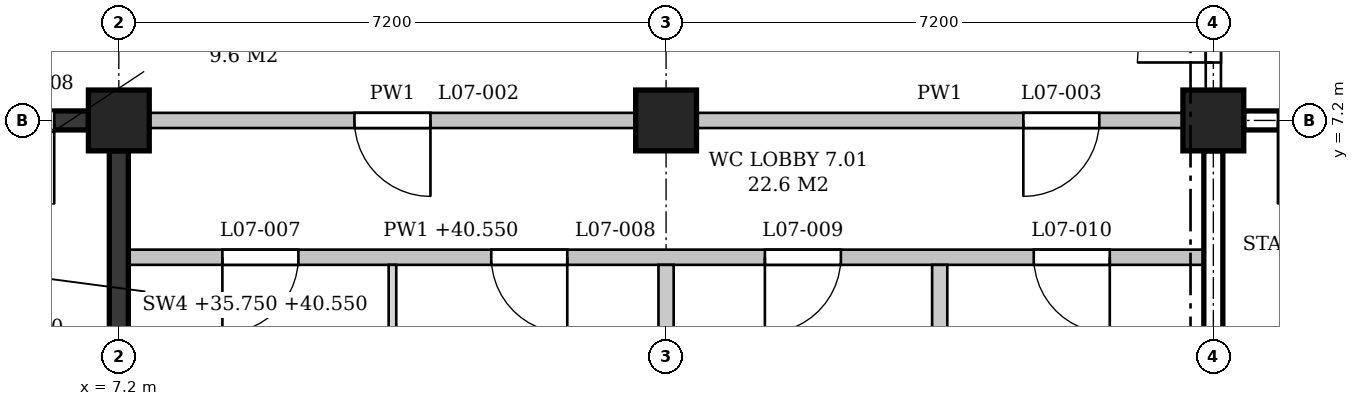
"""IFC4 building model, lengths in metres.
Left out: names, types, materials, properties, quantities, classifications, styles, units other than length and angle.
Written with IfcOpenShell. Run it as: python <this file> out.ifc"""

import sys

from ifc_helpers import new_model, si_unit, direction, frame, frame_2d, origin, origin_2d, place, context, subcontext, project, spatial, polyline, rectangle, outline, extrude, element, fill, save


model = new_model("IFC4")
c1 = context("Model", 3, precision=1e-05, world=origin(), true_north=direction((0.0, 1.0)))
c2 = subcontext(c1, "Body", "Model", "MODEL_VIEW")
j1 = project(units=[si_unit("LENGTHUNIT", "METRE"), si_unit("PLANEANGLEUNIT", "RADIAN")], contexts=[c1])
p1 = place(None, origin())
s1 = spatial("IfcSite", under=j1, at=p1, CompositionType="ELEMENT")
p2 = place(p1, origin())
s2 = spatial("IfcBuilding", under=s1, at=p2, CompositionType="ELEMENT")
p3 = place(p2, frame((0.0, 0.0, 36.0)))
s3 = spatial("IfcBuildingStorey", under=s2, at=p3, CompositionType="ELEMENT", Elevation=36.0)
for number, where, z_axis, x_axis in (
    (1, (7.2, 7.2, 0.0), (0.0, 0.0, 1.0), (1.0, 0.0, 0.0)),
    (2, (14.4, 7.2, 0.0), (0.0, 0.0, 1.0), (1.0, 0.0, 0.0)),
    (3, (21.6, 7.2, 0.0), (0.0, 0.0, 1.0), (1.0, 0.0, 0.0)),
):
    element("IfcColumn", number, at=place(p3, frame(where, z_axis=z_axis, x_axis=x_axis)), inside=s3, PredefinedType="COLUMN", context=c2, shape_type="SweptSolid", body=[
        extrude(rectangle(XDim=0.8, YDim=0.8, at=origin_2d()), origin(), (0.0, 0.0, 1.0), 4.8),
    ])
p4 = place(p3, frame((0.4, 7.2, 0.0), z_axis=(0.0, 0.0, 1.0), x_axis=(1.0, 0.0, 0.0)))
e4 = element("IfcWall", 4, at=p4, inside=s3, PredefinedType="SHEAR", context=c2, shape_type="SweptSolid", body=[
    extrude(rectangle(XDim=6.4, YDim=0.25, at=frame_2d((3.2, 0.0))), origin(), (0.0, 0.0, 1.0), 3.85),
])
p5 = place(p4, frame((4.85, 0.0, 0.0)))
e5 = element("IfcOpeningElement", 5, at=p5, cuts=e4, PredefinedType="OPENING", context=c2, shape_type="SweptSolid", body=[
    extrude(rectangle(XDim=1.1, YDim=2.1, at=frame_2d((0.55, 1.05))), frame((0.0, 0.135, 0.0), z_axis=(0.0, -1.0, 0.0), x_axis=(1.0, 0.0, 0.0)), (0.0, 0.0, 1.0), 0.27),
])
p6 = place(p3, frame((7.2, 0.4, 0.0), z_axis=(0.0, 0.0, 1.0), x_axis=(0.0, 1.0, 0.0)))
e6 = element("IfcWall", 6, at=p6, inside=s3, PredefinedType="SHEAR", context=c2, shape_type="SweptSolid", body=[
    extrude(rectangle(XDim=6.4, YDim=0.25, at=frame_2d((3.2, 0.0))), origin(), (0.0, 0.0, 1.0), 3.85),
])
p7 = place(p3, frame((22.0, 7.2, 0.0), z_axis=(0.0, 0.0, 1.0), x_axis=(1.0, 0.0, 0.0)))
e7 = element("IfcWall", 7, at=p7, inside=s3, PredefinedType="SHEAR", context=c2, shape_type="SweptSolid", body=[
    extrude(rectangle(XDim=6.4, YDim=0.25, at=frame_2d((3.2, 0.0))), origin(), (0.0, 0.0, 1.0), 3.85),
])
p8 = place(p7, frame((0.45, 0.0, 0.0)))
e8 = element("IfcOpeningElement", 8, at=p8, cuts=e7, PredefinedType="OPENING", context=c2, shape_type="SweptSolid", body=[
    extrude(rectangle(XDim=1.1, YDim=2.1, at=frame_2d((0.55, 1.05))), frame((0.0, 0.135, 0.0), z_axis=(0.0, -1.0, 0.0), x_axis=(1.0, 0.0, 0.0)), (0.0, 0.0, 1.0), 0.27),
])
p9 = place(p3, frame((21.6, 0.4, 0.0), z_axis=(0.0, 0.0, 1.0), x_axis=(0.0, 1.0, 0.0)))
e9 = element("IfcWall", 9, at=p9, inside=s3, PredefinedType="SHEAR", context=c2, shape_type="SweptSolid", body=[
    extrude(rectangle(XDim=6.4, YDim=0.25, at=frame_2d((3.2, 0.0))), origin(), (0.0, 0.0, 1.0), 3.85),
])
p10 = place(p3, frame((7.325, 5.4, 0.0), z_axis=(0.0, 0.0, 1.0), x_axis=(1.0, 0.0, 0.0)))
e10 = element("IfcWall", 10, at=p10, inside=s3, PredefinedType="PARTITIONING", context=c2, shape_type="SweptSolid", body=[
    extrude(outline(polyline([(0.0, 0.0), (14.15, 0.0), (14.15, 3.85), (14.05, 3.85), (14.05, 4.55), (7.3, 4.55), (7.3, 3.85), (6.85, 3.85), (6.85, 4.55), (0.1, 4.55), (0.1, 3.85), (0.0, 3.85), (0.0, 0.0)])), frame((0.0, 0.1, 0.0), z_axis=(0.0, -1.0, 0.0), x_axis=(1.0, 0.0, 0.0)), (0.0, 0.0, 1.0), 0.2),
])
p11 = place(p10, frame((1.238, 0.0, 0.0)))
e11 = element("IfcOpeningElement", 11, at=p11, cuts=e10, PredefinedType="OPENING", context=c2, shape_type="SweptSolid", body=[
    extrude(rectangle(XDim=1.0, YDim=2.1, at=frame_2d((0.5, 1.05))), frame((0.0, 0.11, 0.0), z_axis=(0.0, -1.0, 0.0), x_axis=(1.0, 0.0, 0.0)), (0.0, 0.0, 1.0), 0.22),
])
p12 = place(p10, frame((4.775, 0.0, 0.0)))
e12 = element("IfcOpeningElement", 12, at=p12, cuts=e10, PredefinedType="OPENING", context=c2, shape_type="SweptSolid", body=[
    extrude(rectangle(XDim=1.0, YDim=2.1, at=frame_2d((0.5, 1.05))), frame((0.0, 0.11, 0.0), z_axis=(0.0, -1.0, 0.0), x_axis=(1.0, 0.0, 0.0)), (0.0, 0.0, 1.0), 0.22),
])
p13 = place(p10, frame((8.375, 0.0, 0.0)))
e13 = element("IfcOpeningElement", 13, at=p13, cuts=e10, PredefinedType="OPENING", context=c2, shape_type="SweptSolid", body=[
    extrude(rectangle(XDim=1.0, YDim=2.1, at=frame_2d((0.5, 1.05))), frame((0.0, 0.11, 0.0), z_axis=(0.0, -1.0, 0.0), x_axis=(1.0, 0.0, 0.0)), (0.0, 0.0, 1.0), 0.22),
])
p14 = place(p10, frame((11.913, 0.0, 0.0)))
e14 = element("IfcOpeningElement", 14, at=p14, cuts=e10, PredefinedType="OPENING", context=c2, shape_type="SweptSolid", body=[
    extrude(rectangle(XDim=1.0, YDim=2.1, at=frame_2d((0.5, 1.05))), frame((0.0, 0.11, 0.0), z_axis=(0.0, -1.0, 0.0), x_axis=(1.0, 0.0, 0.0)), (0.0, 0.0, 1.0), 0.22),
])
p15 = place(p3, frame((7.6, 7.2, 0.0), z_axis=(0.0, 0.0, 1.0), x_axis=(1.0, 0.0, 0.0)))
e15 = element("IfcWall", 15, at=p15, inside=s3, PredefinedType="PARTITIONING", context=c2, shape_type="SweptSolid", body=[
    extrude(rectangle(XDim=6.4, YDim=0.2, at=frame_2d((3.2, 0.0))), origin(), (0.0, 0.0, 1.0), 3.85),
])
p16 = place(p15, frame((2.7, 0.0, 0.0)))
e16 = element("IfcOpeningElement", 16, at=p16, cuts=e15, PredefinedType="OPENING", context=c2, shape_type="SweptSolid", body=[
    extrude(rectangle(XDim=1.0, YDim=2.1, at=frame_2d((0.5, 1.05))), frame((0.0, 0.11, 0.0), z_axis=(0.0, -1.0, 0.0), x_axis=(1.0, 0.0, 0.0)), (0.0, 0.0, 1.0), 0.22),
])
p17 = place(p3, frame((14.8, 7.2, 0.0), z_axis=(0.0, 0.0, 1.0), x_axis=(1.0, 0.0, 0.0)))
e17 = element("IfcWall", 17, at=p17, inside=s3, PredefinedType="PARTITIONING", context=c2, shape_type="SweptSolid", body=[
    extrude(rectangle(XDim=6.4, YDim=0.2, at=frame_2d((3.2, 0.0))), origin(), (0.0, 0.0, 1.0), 3.85),
])
p18 = place(p17, frame((4.3, 0.0, 0.0)))
e18 = element("IfcOpeningElement", 18, at=p18, cuts=e17, PredefinedType="OPENING", context=c2, shape_type="SweptSolid", body=[
    extrude(rectangle(XDim=1.0, YDim=2.1, at=frame_2d((0.5, 1.05))), frame((0.0, 0.11, 0.0), z_axis=(0.0, -1.0, 0.0), x_axis=(1.0, 0.0, 0.0)), (0.0, 0.0, 1.0), 0.22),
])
p19 = place(p3, frame((10.8, 0.15, 0.0), z_axis=(0.0, 0.0, 1.0), x_axis=(0.0, 1.0, 0.0)))
e19 = element("IfcWall", 19, at=p19, inside=s3, PredefinedType="PARTITIONING", context=c2, shape_type="SweptSolid", body=[
    extrude(rectangle(XDim=5.15, YDim=0.1, at=frame_2d((2.575, 0.0))), origin(), (0.0, 0.0, 1.0), 3.85),
])
p20 = place(p3, frame((14.4, 0.4, 0.0), z_axis=(0.0, 0.0, 1.0), x_axis=(0.0, 1.0, 0.0)))
e20 = element("IfcWall", 20, at=p20, inside=s3, PredefinedType="PARTITIONING", context=c2, shape_type="SweptSolid", body=[
    extrude(rectangle(XDim=4.9, YDim=0.2, at=frame_2d((2.45, 0.0))), origin(), (0.0, 0.0, 1.0), 3.85),
])
p21 = place(p3, frame((18.0, 0.15, 0.0), z_axis=(0.0, 0.0, 1.0), x_axis=(0.0, 1.0, 0.0)))
e21 = element("IfcWall", 21, at=p21, inside=s3, PredefinedType="PARTITIONING", context=c2, shape_type="SweptSolid", body=[
    extrude(outline(polyline([(0.0, 0.0), (5.15, 0.0), (5.15, 4.55), (0.05, 4.55), (0.05, 3.95), (0.0, 3.95), (0.0, 0.0)])), frame((0.0, 0.1, 0.0), z_axis=(0.0, -1.0, 0.0), x_axis=(1.0, 0.0, 0.0)), (0.0, 0.0, 1.0), 0.2),
])
p22 = place(p3, frame((21.6, 7.6, 0.0), z_axis=(0.0, 0.0, 1.0), x_axis=(0.0, 1.0, 0.0)))
e22 = element("IfcWall", 22, at=p22, inside=s3, PredefinedType="PARTITIONING", context=c2, shape_type="SweptSolid", body=[
    extrude(rectangle(XDim=2.725, YDim=0.2, at=frame_2d((1.362, 0.0))), origin(), (0.0, 0.0, 1.0), 3.85),
])
p23 = place(p22, frame((0.362, 0.0, 0.0)))
e23 = element("IfcOpeningElement", 23, at=p23, cuts=e22, PredefinedType="OPENING", context=c2, shape_type="SweptSolid", body=[
    extrude(rectangle(XDim=2.0, YDim=2.4, at=frame_2d((1.0, 1.2))), frame((0.0, 0.11, 0.0), z_axis=(0.0, -1.0, 0.0), x_axis=(1.0, 0.0, 0.0)), (0.0, 0.0, 1.0), 0.22),
])
p24 = place(p5, frame((1.1, 0.0, 0.0), z_axis=(0.0, 0.0, 1.0), x_axis=(-1.0, 0.0, 0.0)))
e24 = element("IfcDoor", 24, at=p24, inside=s3, OperationType="SINGLE_SWING_LEFT", PredefinedType="DOOR", context=c2, shape_type="SweptSolid", body=[
    extrude(rectangle(XDim=1.1, YDim=2.1, at=frame_2d((0.55, 1.05))), frame((0.0, 0.025, 0.0), z_axis=(0.0, -1.0, 0.0), x_axis=(1.0, 0.0, 0.0)), (0.0, 0.0, 1.0), 0.05),
])
fill(e5, e24)
p25 = place(p8, frame((1.1, 0.0, 0.0), z_axis=(0.0, 0.0, 1.0), x_axis=(-1.0, 0.0, 0.0)))
e25 = element("IfcDoor", 25, at=p25, inside=s3, OperationType="SINGLE_SWING_RIGHT", PredefinedType="DOOR", context=c2, shape_type="SweptSolid", body=[
    extrude(rectangle(XDim=1.1, YDim=2.1, at=frame_2d((0.55, 1.05))), frame((0.0, 0.025, 0.0), z_axis=(0.0, -1.0, 0.0), x_axis=(1.0, 0.0, 0.0)), (0.0, 0.0, 1.0), 0.05),
])
fill(e8, e25)
p26 = place(p23, origin())
e26 = element("IfcDoor", 26, at=p26, inside=s3, OperationType="DOUBLE_DOOR_SINGLE_SWING", PredefinedType="DOOR", context=c2, shape_type="SweptSolid", body=[
    extrude(rectangle(XDim=2.0, YDim=2.4, at=frame_2d((1.0, 1.2))), frame((0.0, 0.025, 0.0), z_axis=(0.0, -1.0, 0.0), x_axis=(1.0, 0.0, 0.0)), (0.0, 0.0, 1.0), 0.05),
])
fill(e23, e26)
p27 = place(p16, frame((1.0, 0.0, 0.0), z_axis=(0.0, 0.0, 1.0), x_axis=(-1.0, 0.0, 0.0)))
e27 = element("IfcDoor", 27, at=p27, inside=s3, OperationType="SINGLE_SWING_LEFT", PredefinedType="DOOR", context=c2, shape_type="SweptSolid", body=[
    extrude(rectangle(XDim=1.0, YDim=2.1, at=frame_2d((0.5, 1.05))), frame((0.0, 0.025, 0.0), z_axis=(0.0, -1.0, 0.0), x_axis=(1.0, 0.0, 0.0)), (0.0, 0.0, 1.0), 0.05),
])
fill(e16, e27)
p28 = place(p18, frame((1.0, 0.0, 0.0), z_axis=(0.0, 0.0, 1.0), x_axis=(-1.0, 0.0, 0.0)))
e28 = element("IfcDoor", 28, at=p28, inside=s3, OperationType="SINGLE_SWING_RIGHT", PredefinedType="DOOR", context=c2, shape_type="SweptSolid", body=[
    extrude(rectangle(XDim=1.0, YDim=2.1, at=frame_2d((0.5, 1.05))), frame((0.0, 0.025, 0.0), z_axis=(0.0, -1.0, 0.0), x_axis=(1.0, 0.0, 0.0)), (0.0, 0.0, 1.0), 0.05),
])
fill(e18, e28)
p29 = place(p11, frame((1.0, 0.0, 0.0), z_axis=(0.0, 0.0, 1.0), x_axis=(-1.0, 0.0, 0.0)))
e29 = element("IfcDoor", 29, at=p29, inside=s3, OperationType="SINGLE_SWING_RIGHT", PredefinedType="DOOR", context=c2, shape_type="SweptSolid", body=[
    extrude(rectangle(XDim=1.0, YDim=2.1, at=frame_2d((0.5, 1.05))), frame((0.0, 0.025, 0.0), z_axis=(0.0, -1.0, 0.0), x_axis=(1.0, 0.0, 0.0)), (0.0, 0.0, 1.0), 0.05),
])
fill(e11, e29)
p30 = place(p12, frame((1.0, 0.0, 0.0), z_axis=(0.0, 0.0, 1.0), x_axis=(-1.0, 0.0, 0.0)))
e30 = element("IfcDoor", 30, at=p30, inside=s3, OperationType="SINGLE_SWING_LEFT", PredefinedType="DOOR", context=c2, shape_type="SweptSolid", body=[
    extrude(rectangle(XDim=1.0, YDim=2.1, at=frame_2d((0.5, 1.05))), frame((0.0, 0.025, 0.0), z_axis=(0.0, -1.0, 0.0), x_axis=(1.0, 0.0, 0.0)), (0.0, 0.0, 1.0), 0.05),
])
fill(e12, e30)
p31 = place(p13, frame((1.0, 0.0, 0.0), z_axis=(0.0, 0.0, 1.0), x_axis=(-1.0, 0.0, 0.0)))
e31 = element("IfcDoor", 31, at=p31, inside=s3, OperationType="SINGLE_SWING_RIGHT", PredefinedType="DOOR", context=c2, shape_type="SweptSolid", body=[
    extrude(rectangle(XDim=1.0, YDim=2.1, at=frame_2d((0.5, 1.05))), frame((0.0, 0.025, 0.0), z_axis=(0.0, -1.0, 0.0), x_axis=(1.0, 0.0, 0.0)), (0.0, 0.0, 1.0), 0.05),
])
fill(e13, e31)
p32 = place(p14, frame((1.0, 0.0, 0.0), z_axis=(0.0, 0.0, 1.0), x_axis=(-1.0, 0.0, 0.0)))
e32 = element("IfcDoor", 32, at=p32, inside=s3, OperationType="SINGLE_SWING_LEFT", PredefinedType="DOOR", context=c2, shape_type="SweptSolid", body=[
    extrude(rectangle(XDim=1.0, YDim=2.1, at=frame_2d((0.5, 1.05))), frame((0.0, 0.025, 0.0), z_axis=(0.0, -1.0, 0.0), x_axis=(1.0, 0.0, 0.0)), (0.0, 0.0, 1.0), 0.05),
])
fill(e14, e32)
save(model, sys.argv[1])
